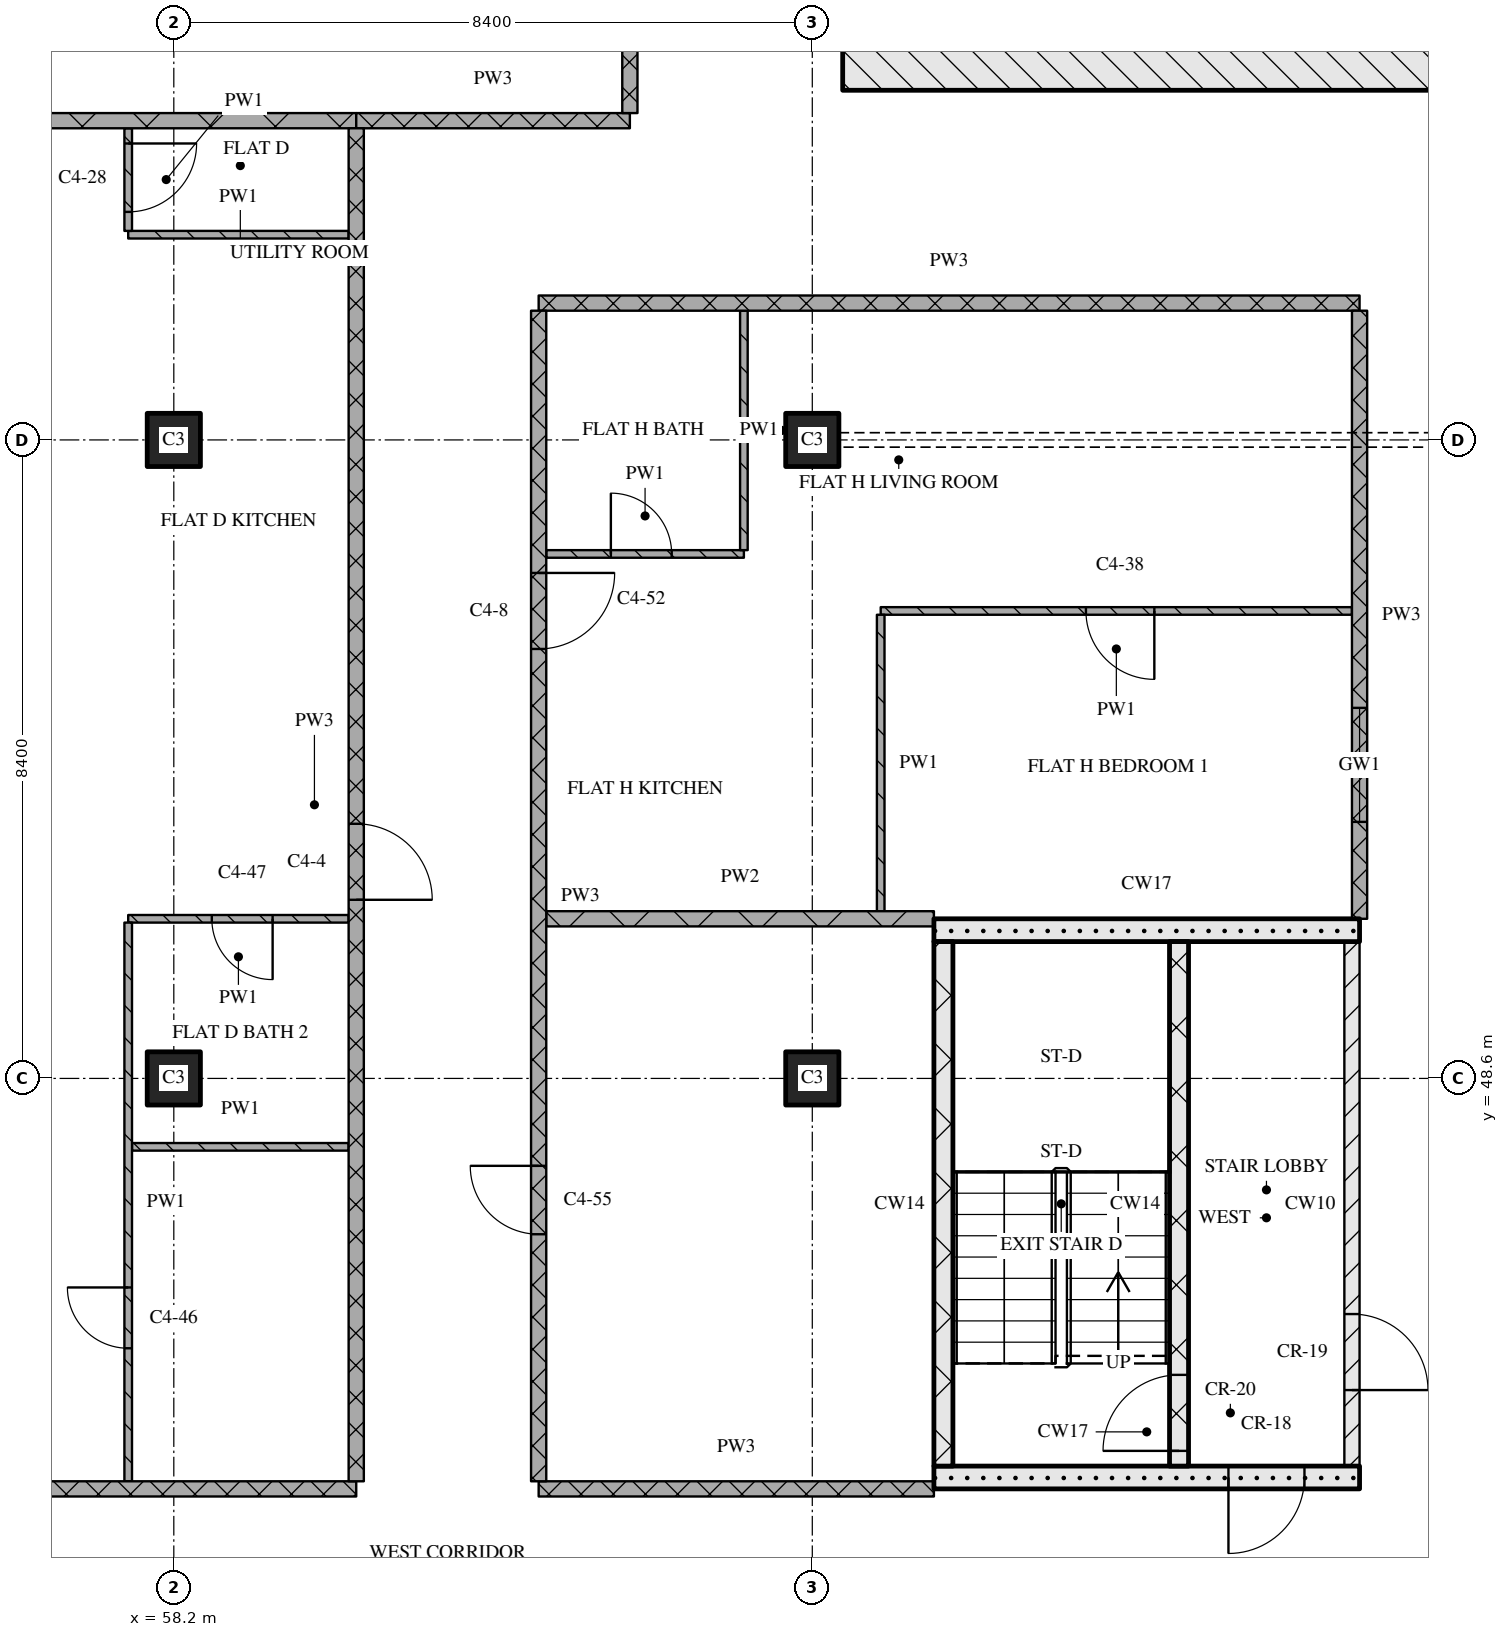
"""IFC4 building model, lengths in metres.
Left out: names, types, materials, properties, quantities, classifications, styles, units other than length and angle.
Written with IfcOpenShell. Run it as: python <this file> out.ifc"""

import sys

from ifc_helpers import new_model, si_unit, direction, frame, frame_2d, origin, origin_2d, place, context, subcontext, project, spatial, rectangle, extrude, element, fill, save


model = new_model("IFC4")
c1 = context("Model", 3, precision=1e-05, world=origin(), true_north=direction((0.0, 1.0)))
c2 = subcontext(c1, "Body", "Model", "MODEL_VIEW")
j1 = project(units=[si_unit("LENGTHUNIT", "METRE"), si_unit("PLANEANGLEUNIT", "RADIAN")], contexts=[c1])
p1 = place(None, origin())
s1 = spatial("IfcSite", under=j1, at=p1, CompositionType="ELEMENT")
p2 = place(p1, origin())
s2 = spatial("IfcBuilding", under=s1, at=p2, CompositionType="ELEMENT")
p3 = place(p2, frame((0.0, 0.0, 179.85)))
s3 = spatial("IfcBuildingStorey", under=s2, at=p3, CompositionType="ELEMENT", Elevation=179.85)
for number, where, z_axis, x_axis in (
    (1, (58.2, 48.6, 0.0), (0.0, 0.0, 1.0), (1.0, 0.0, 0.0)),
    (2, (58.2, 57.0, 0.0), (0.0, 0.0, 1.0), (1.0, 0.0, 0.0)),
    (3, (66.6, 48.6, 0.0), (0.0, 0.0, 1.0), (1.0, 0.0, 0.0)),
    (4, (66.6, 57.0, 0.0), (0.0, 0.0, 1.0), (1.0, 0.0, 0.0)),
):
    element("IfcColumn", number, at=place(p3, frame(where, z_axis=z_axis, x_axis=x_axis)), inside=s3, PredefinedType="COLUMN", context=c2, shape_type="SweptSolid", body=[
        extrude(rectangle(XDim=0.7, YDim=0.7, at=origin_2d()), origin(), (0.0, 0.0, 1.0), 3.6),
    ])
p4 = place(p3, frame((67.0, 62.0, 0.0), z_axis=(0.0, 0.0, 1.0), x_axis=(1.0, 0.0, 0.0)))
e5 = element("IfcWall", 5, at=p4, inside=s3, PredefinedType="SOLIDWALL", context=c2, shape_type="SweptSolid", body=[
    extrude(rectangle(XDim=41.2, YDim=0.8, at=frame_2d((20.6, 0.0))), origin(), (0.0, 0.0, 1.0), 3.32),
])
p5 = place(p4, frame((20.95, 0.0, 0.0)))
e6 = element("IfcOpeningElement", 6, at=p5, cuts=e5, PredefinedType="OPENING", context=c2, shape_type="SweptSolid", body=[
    extrude(rectangle(XDim=1.8, YDim=2.1, at=frame_2d((0.9, 1.05))), frame((0.0, 0.41, 0.0), z_axis=(0.0, -1.0, 0.0), x_axis=(1.0, 0.0, 0.0)), (0.0, 0.0, 1.0), 0.82),
])
p6 = place(p3, frame((68.2, 43.35, 0.0), z_axis=(0.0, 0.0, 1.0), x_axis=(1.0, 0.0, 0.0)))
e7 = element("IfcWall", 7, at=p6, inside=s3, PredefinedType="SOLIDWALL", context=c2, shape_type="SweptSolid", body=[
    extrude(rectangle(XDim=5.6, YDim=0.3, at=frame_2d((2.8, 0.0))), origin(), (0.0, 0.0, 1.0), 3.32),
])
p7 = place(p6, frame((3.875, 0.0, 0.0)))
e8 = element("IfcOpeningElement", 8, at=p7, cuts=e7, PredefinedType="OPENING", context=c2, shape_type="SweptSolid", body=[
    extrude(rectangle(XDim=1.0, YDim=2.1, at=frame_2d((0.5, 1.05))), frame((0.0, 0.16, 0.0), z_axis=(0.0, -1.0, 0.0), x_axis=(1.0, 0.0, 0.0)), (0.0, 0.0, 1.0), 0.32),
])
p8 = place(p3, frame((68.325, 43.5, 0.0), z_axis=(0.0, 0.0, 1.0), x_axis=(0.0, 1.0, 0.0)))
e9 = element("IfcWall", 9, at=p8, inside=s3, PredefinedType="SOLIDWALL", context=c2, shape_type="SweptSolid", body=[
    extrude(rectangle(XDim=6.9, YDim=0.25, at=frame_2d((3.45, 0.0))), origin(), (0.0, 0.0, 1.0), 3.32),
])
p9 = place(p3, frame((71.425, 43.5, 0.0), z_axis=(0.0, 0.0, 1.0), x_axis=(0.0, 1.0, 0.0)))
e10 = element("IfcWall", 10, at=p9, inside=s3, PredefinedType="SOLIDWALL", context=c2, shape_type="SweptSolid", body=[
    extrude(rectangle(XDim=6.9, YDim=0.25, at=frame_2d((3.45, 0.0))), origin(), (0.0, 0.0, 1.0), 3.32),
])
p10 = place(p9, frame((0.2, 0.0, 0.0)))
e11 = element("IfcOpeningElement", 11, at=p10, cuts=e10, PredefinedType="OPENING", context=c2, shape_type="SweptSolid", body=[
    extrude(rectangle(XDim=1.0, YDim=2.1, at=frame_2d((0.5, 1.05))), frame((0.0, 0.135, 0.0), z_axis=(0.0, -1.0, 0.0), x_axis=(1.0, 0.0, 0.0)), (0.0, 0.0, 1.0), 0.27),
])
p11 = place(p3, frame((73.7, 43.5, 0.0), z_axis=(0.0, 0.0, 1.0), x_axis=(0.0, 1.0, 0.0)))
e12 = element("IfcWall", 12, at=p11, inside=s3, PredefinedType="PARTITIONING", context=c2, shape_type="SweptSolid", body=[
    extrude(rectangle(XDim=6.9, YDim=0.2, at=frame_2d((3.45, 0.0))), origin(), (0.0, 0.0, 1.0), 3.32),
])
p12 = place(p11, frame((1.0, 0.0, 0.0)))
e13 = element("IfcOpeningElement", 13, at=p12, cuts=e12, PredefinedType="OPENING", context=c2, shape_type="SweptSolid", body=[
    extrude(rectangle(XDim=1.0, YDim=2.1, at=frame_2d((0.5, 1.05))), frame((0.0, 0.11, 0.0), z_axis=(0.0, -1.0, 0.0), x_axis=(1.0, 0.0, 0.0)), (0.0, 0.0, 1.0), 0.22),
])
p13 = place(p3, frame((68.2, 50.55, 0.0), z_axis=(0.0, 0.0, 1.0), x_axis=(1.0, 0.0, 0.0)))
e14 = element("IfcWall", 14, at=p13, inside=s3, PredefinedType="SOLIDWALL", context=c2, shape_type="SweptSolid", body=[
    extrude(rectangle(XDim=5.6, YDim=0.3, at=frame_2d((2.8, 0.0))), origin(), (0.0, 0.0, 1.0), 3.32),
])
p14 = place(p3, frame((48.28, 43.2, 0.0), z_axis=(0.0, 0.0, 1.0), x_axis=(1.0, 0.0, 0.0)))
e15 = element("IfcWall", 15, at=p14, inside=s3, PredefinedType="PARTITIONING", context=c2, shape_type="SweptSolid", body=[
    extrude(rectangle(XDim=12.32, YDim=0.2, at=frame_2d((6.16, 0.0))), origin(), (0.0, 0.0, 1.0), 3.32),
])
p15 = place(p3, frame((63.0, 43.2, 0.0), z_axis=(0.0, 0.0, 1.0), x_axis=(1.0, 0.0, 0.0)))
e16 = element("IfcWall", 16, at=p15, inside=s3, PredefinedType="PARTITIONING", context=c2, shape_type="SweptSolid", body=[
    extrude(rectangle(XDim=5.2, YDim=0.2, at=frame_2d((2.6, 0.0))), origin(), (0.0, 0.0, 1.0), 3.32),
])
p16 = place(p3, frame((57.65, 47.7, 0.0), z_axis=(0.0, 0.0, 1.0), x_axis=(1.0, 0.0, 0.0)))
e17 = element("IfcWall", 17, at=p16, inside=s3, PredefinedType="PARTITIONING", context=c2, shape_type="SweptSolid", body=[
    extrude(rectangle(XDim=2.85, YDim=0.1, at=frame_2d((1.425, 0.0))), origin(), (0.0, 0.0, 1.0), 3.32),
])
p17 = place(p3, frame((63.1, 50.7, 0.0), z_axis=(0.0, 0.0, 1.0), x_axis=(1.0, 0.0, 0.0)))
e18 = element("IfcWall", 18, at=p17, inside=s3, PredefinedType="PARTITIONING", context=c2, shape_type="SweptSolid", body=[
    extrude(rectangle(XDim=5.1, YDim=0.2, at=frame_2d((2.55, 0.0))), origin(), (0.0, 0.0, 1.0), 3.32),
])
p18 = place(p3, frame((60.5, 50.7, 0.0), z_axis=(0.0, 0.0, 1.0), x_axis=(-1.0, 0.0, 0.0)))
e19 = element("IfcWall", 19, at=p18, inside=s3, PredefinedType="PARTITIONING", context=c2, shape_type="SweptSolid", body=[
    extrude(rectangle(XDim=2.9, YDim=0.1, at=frame_2d((1.45, 0.0))), origin(), (0.0, 0.0, 1.0), 3.32),
])
p19 = place(p18, frame((1.0, 0.0, 0.0)))
e20 = element("IfcOpeningElement", 20, at=p19, cuts=e19, PredefinedType="OPENING", context=c2, shape_type="SweptSolid", body=[
    extrude(rectangle(XDim=0.8, YDim=2.1, at=frame_2d((0.4, 1.05))), frame((0.0, 0.06, 0.0), z_axis=(0.0, -1.0, 0.0), x_axis=(1.0, 0.0, 0.0)), (0.0, 0.0, 1.0), 0.12),
])
p20 = place(p3, frame((73.7, 54.75, 0.0), z_axis=(0.0, 0.0, 1.0), x_axis=(-1.0, 0.0, 0.0)))
e21 = element("IfcWall", 21, at=p20, inside=s3, PredefinedType="PARTITIONING", context=c2, shape_type="SweptSolid", body=[
    extrude(rectangle(XDim=6.2, YDim=0.1, at=frame_2d((3.1, 0.0))), origin(), (0.0, 0.0, 1.0), 3.32),
])
p21 = place(p20, frame((2.6, 0.0, 0.0)))
e22 = element("IfcOpeningElement", 22, at=p21, cuts=e21, PredefinedType="OPENING", context=c2, shape_type="SweptSolid", body=[
    extrude(rectangle(XDim=0.9, YDim=2.1, at=frame_2d((0.45, 1.05))), frame((0.0, 0.06, 0.0), z_axis=(0.0, -1.0, 0.0), x_axis=(1.0, 0.0, 0.0)), (0.0, 0.0, 1.0), 0.12),
])
p22 = place(p3, frame((63.1, 55.5, 0.0), z_axis=(0.0, 0.0, 1.0), x_axis=(1.0, 0.0, 0.0)))
e23 = element("IfcWall", 23, at=p22, inside=s3, PredefinedType="PARTITIONING", context=c2, shape_type="SweptSolid", body=[
    extrude(rectangle(XDim=2.6, YDim=0.1, at=frame_2d((1.3, 0.0))), origin(), (0.0, 0.0, 1.0), 3.32),
])
p23 = place(p22, frame((0.85, 0.0, 0.0)))
e24 = element("IfcOpeningElement", 24, at=p23, cuts=e23, PredefinedType="OPENING", context=c2, shape_type="SweptSolid", body=[
    extrude(rectangle(XDim=0.8, YDim=2.1, at=frame_2d((0.4, 1.05))), frame((0.0, 0.06, 0.0), z_axis=(0.0, -1.0, 0.0), x_axis=(1.0, 0.0, 0.0)), (0.0, 0.0, 1.0), 0.12),
])
p24 = place(p3, frame((63.0, 58.8, 0.0), z_axis=(0.0, 0.0, 1.0), x_axis=(1.0, 0.0, 0.0)))
e25 = element("IfcWall", 25, at=p24, inside=s3, PredefinedType="PARTITIONING", context=c2, shape_type="SweptSolid", body=[
    extrude(rectangle(XDim=10.8, YDim=0.2, at=frame_2d((5.4, 0.0))), origin(), (0.0, 0.0, 1.0), 3.32),
])
p25 = place(p3, frame((57.6, 59.7, 0.0), z_axis=(0.0, 0.0, 1.0), x_axis=(1.0, 0.0, 0.0)))
e26 = element("IfcWall", 26, at=p25, inside=s3, PredefinedType="PARTITIONING", context=c2, shape_type="SweptSolid", body=[
    extrude(rectangle(XDim=2.9, YDim=0.1, at=frame_2d((1.45, 0.0))), origin(), (0.0, 0.0, 1.0), 3.32),
])
p26 = place(p3, frame((60.6, 61.2, 0.0), z_axis=(0.0, 0.0, 1.0), x_axis=(1.0, 0.0, 0.0)))
e27 = element("IfcWall", 27, at=p26, inside=s3, PredefinedType="PARTITIONING", context=c2, shape_type="SweptSolid", body=[
    extrude(rectangle(XDim=3.6, YDim=0.2, at=frame_2d((1.8, 0.0))), origin(), (0.0, 0.0, 1.0), 3.32),
])
p27 = place(p3, frame((48.28, 61.2, 0.0), z_axis=(0.0, 0.0, 1.0), x_axis=(1.0, 0.0, 0.0)))
e28 = element("IfcWall", 28, at=p27, inside=s3, PredefinedType="PARTITIONING", context=c2, shape_type="SweptSolid", body=[
    extrude(rectangle(XDim=12.32, YDim=0.2, at=frame_2d((6.16, 0.0))), origin(), (0.0, 0.0, 1.0), 3.32),
])
p28 = place(p3, frame((57.6, 50.65, 0.0), z_axis=(0.0, 0.0, 1.0), x_axis=(0.0, -1.0, 0.0)))
e29 = element("IfcWall", 29, at=p28, inside=s3, PredefinedType="PARTITIONING", context=c2, shape_type="SweptSolid", body=[
    extrude(rectangle(XDim=7.35, YDim=0.1, at=frame_2d((3.675, 0.0))), origin(), (0.0, 0.0, 1.0), 3.32),
])
p29 = place(p28, frame((4.8, 0.0, 0.0)))
e30 = element("IfcOpeningElement", 30, at=p29, cuts=e29, PredefinedType="OPENING", context=c2, shape_type="SweptSolid", body=[
    extrude(rectangle(XDim=0.8, YDim=2.1, at=frame_2d((0.4, 1.05))), frame((0.0, 0.06, 0.0), z_axis=(0.0, -1.0, 0.0), x_axis=(1.0, 0.0, 0.0)), (0.0, 0.0, 1.0), 0.12),
])
p30 = place(p3, frame((57.6, 61.1, 0.0), z_axis=(0.0, 0.0, 1.0), x_axis=(0.0, -1.0, 0.0)))
e31 = element("IfcWall", 31, at=p30, inside=s3, PredefinedType="PARTITIONING", context=c2, shape_type="SweptSolid", body=[
    extrude(rectangle(XDim=1.35, YDim=0.1, at=frame_2d((0.675, 0.0))), origin(), (0.0, 0.0, 1.0), 3.32),
])
p31 = place(p30, frame((0.2, 0.0, 0.0)))
e32 = element("IfcOpeningElement", 32, at=p31, cuts=e31, PredefinedType="OPENING", context=c2, shape_type="SweptSolid", body=[
    extrude(rectangle(XDim=0.9, YDim=2.1, at=frame_2d((0.45, 1.05))), frame((0.0, 0.06, 0.0), z_axis=(0.0, -1.0, 0.0), x_axis=(1.0, 0.0, 0.0)), (0.0, 0.0, 1.0), 0.12),
])
p32 = place(p3, frame((60.6, 43.3, 0.0), z_axis=(0.0, 0.0, 1.0), x_axis=(0.0, 1.0, 0.0)))
e33 = element("IfcWall", 33, at=p32, inside=s3, PredefinedType="PARTITIONING", context=c2, shape_type="SweptSolid", body=[
    extrude(rectangle(XDim=17.8, YDim=0.2, at=frame_2d((8.9, 0.0))), origin(), (0.0, 0.0, 1.0), 3.32),
])
p33 = place(p32, frame((7.65, 0.0, 0.0)))
e34 = element("IfcOpeningElement", 34, at=p33, cuts=e33, PredefinedType="OPENING", context=c2, shape_type="SweptSolid", body=[
    extrude(rectangle(XDim=1.0, YDim=2.1, at=frame_2d((0.5, 1.05))), frame((0.0, 0.11, 0.0), z_axis=(0.0, -1.0, 0.0), x_axis=(1.0, 0.0, 0.0)), (0.0, 0.0, 1.0), 0.22),
])
p34 = place(p3, frame((63.0, 58.7, 0.0), z_axis=(0.0, 0.0, 1.0), x_axis=(0.0, -1.0, 0.0)))
e35 = element("IfcWall", 35, at=p34, inside=s3, PredefinedType="PARTITIONING", context=c2, shape_type="SweptSolid", body=[
    extrude(rectangle(XDim=15.4, YDim=0.2, at=frame_2d((7.7, 0.0))), origin(), (0.0, 0.0, 1.0), 3.32),
])
p35 = place(p34, frame((3.45, 0.0, 0.0)))
e36 = element("IfcOpeningElement", 36, at=p35, cuts=e35, PredefinedType="OPENING", context=c2, shape_type="SweptSolid", body=[
    extrude(rectangle(XDim=1.0, YDim=2.1, at=frame_2d((0.5, 1.05))), frame((0.0, 0.11, 0.0), z_axis=(0.0, -1.0, 0.0), x_axis=(1.0, 0.0, 0.0)), (0.0, 0.0, 1.0), 0.22),
])
p36 = place(p34, frame((11.25, 0.0, 0.0)))
e37 = element("IfcOpeningElement", 37, at=p36, cuts=e35, PredefinedType="OPENING", context=c2, shape_type="SweptSolid", body=[
    extrude(rectangle(XDim=0.9, YDim=2.1, at=frame_2d((0.45, 1.05))), frame((0.0, 0.11, 0.0), z_axis=(0.0, -1.0, 0.0), x_axis=(1.0, 0.0, 0.0)), (0.0, 0.0, 1.0), 0.22),
])
p37 = place(p3, frame((64.2, 61.3, 0.0), z_axis=(0.0, 0.0, 1.0), x_axis=(0.0, 1.0, 0.0)))
e38 = element("IfcWall", 38, at=p37, inside=s3, PredefinedType="PARTITIONING", context=c2, shape_type="SweptSolid", body=[
    extrude(rectangle(XDim=14.02, YDim=0.2, at=frame_2d((7.01, 0.0))), origin(), (0.0, 0.0, 1.0), 3.32),
])
p38 = place(p37, frame((3.45, 0.0, 0.0)))
e39 = element("IfcOpeningElement", 39, at=p38, cuts=e38, PredefinedType="OPENING", context=c2, shape_type="SweptSolid", body=[
    extrude(rectangle(XDim=1.0, YDim=2.1, at=frame_2d((0.5, 1.05))), frame((0.0, 0.11, 0.0), z_axis=(0.0, -1.0, 0.0), x_axis=(1.0, 0.0, 0.0)), (0.0, 0.0, 1.0), 0.22),
])
p39 = place(p3, frame((65.7, 58.7, 0.0), z_axis=(0.0, 0.0, 1.0), x_axis=(0.0, -1.0, 0.0)))
e40 = element("IfcWall", 40, at=p39, inside=s3, PredefinedType="PARTITIONING", context=c2, shape_type="SweptSolid", body=[
    extrude(rectangle(XDim=3.15, YDim=0.1, at=frame_2d((1.575, 0.0))), origin(), (0.0, 0.0, 1.0), 3.32),
])
p40 = place(p3, frame((67.5, 54.7, 0.0), z_axis=(0.0, 0.0, 1.0), x_axis=(0.0, -1.0, 0.0)))
e41 = element("IfcWall", 41, at=p40, inside=s3, PredefinedType="PARTITIONING", context=c2, shape_type="SweptSolid", body=[
    extrude(rectangle(XDim=3.9, YDim=0.1, at=frame_2d((1.95, 0.0))), origin(), (0.0, 0.0, 1.0), 3.32),
])
p41 = place(p3, frame((73.8, 58.7, 0.0), z_axis=(0.0, 0.0, 1.0), x_axis=(0.0, -1.0, 0.0)))
e42 = element("IfcWall", 42, at=p41, inside=s3, PredefinedType="PARTITIONING", context=c2, shape_type="SweptSolid", body=[
    extrude(rectangle(XDim=8.0, YDim=0.2, at=frame_2d((4.0, 0.0))), origin(), (0.0, 0.0, 1.0), 3.32),
])
p42 = place(p41, frame((5.225, 0.0, 0.9)))
e43 = element("IfcOpeningElement", 43, at=p42, cuts=e42, PredefinedType="OPENING", context=c2, shape_type="SweptSolid", body=[
    extrude(rectangle(XDim=1.5, YDim=1.5, at=frame_2d((0.75, 0.75))), frame((0.0, 0.11, 0.0), z_axis=(0.0, -1.0, 0.0), x_axis=(1.0, 0.0, 0.0)), (0.0, 0.0, 1.0), 0.22),
])
p43 = place(p7, origin())
e44 = element("IfcDoor", 44, at=p43, inside=s3, OperationType="SINGLE_SWING_RIGHT", PredefinedType="DOOR", context=c2, shape_type="SweptSolid", body=[
    extrude(rectangle(XDim=1.0, YDim=2.1, at=frame_2d((0.5, 1.05))), frame((0.0, 0.025, 0.0), z_axis=(0.0, -1.0, 0.0), x_axis=(1.0, 0.0, 0.0)), (0.0, 0.0, 1.0), 0.05),
])
fill(e8, e44)
p44 = place(p10, origin())
e45 = element("IfcDoor", 45, at=p44, inside=s3, OperationType="SINGLE_SWING_LEFT", PredefinedType="DOOR", context=c2, shape_type="SweptSolid", body=[
    extrude(rectangle(XDim=1.0, YDim=2.1, at=frame_2d((0.5, 1.05))), frame((0.0, 0.025, 0.0), z_axis=(0.0, -1.0, 0.0), x_axis=(1.0, 0.0, 0.0)), (0.0, 0.0, 1.0), 0.05),
])
fill(e11, e45)
p45 = place(p12, origin())
e46 = element("IfcDoor", 46, at=p45, inside=s3, OperationType="SINGLE_SWING_RIGHT", PredefinedType="DOOR", context=c2, shape_type="SweptSolid", body=[
    extrude(rectangle(XDim=1.0, YDim=2.1, at=frame_2d((0.5, 1.05))), frame((0.0, 0.025, 0.0), z_axis=(0.0, -1.0, 0.0), x_axis=(1.0, 0.0, 0.0)), (0.0, 0.0, 1.0), 0.05),
])
fill(e13, e46)
p46 = place(p19, origin())
e47 = element("IfcDoor", 47, at=p46, inside=s3, OperationType="SINGLE_SWING_LEFT", PredefinedType="DOOR", context=c2, shape_type="SweptSolid", body=[
    extrude(rectangle(XDim=0.8, YDim=2.1, at=frame_2d((0.4, 1.05))), frame((0.0, 0.025, 0.0), z_axis=(0.0, -1.0, 0.0), x_axis=(1.0, 0.0, 0.0)), (0.0, 0.0, 1.0), 0.05),
])
fill(e20, e47)
p47 = place(p21, origin())
e48 = element("IfcDoor", 48, at=p47, inside=s3, OperationType="SINGLE_SWING_LEFT", PredefinedType="DOOR", context=c2, shape_type="SweptSolid", body=[
    extrude(rectangle(XDim=0.9, YDim=2.1, at=frame_2d((0.45, 1.05))), frame((0.0, 0.025, 0.0), z_axis=(0.0, -1.0, 0.0), x_axis=(1.0, 0.0, 0.0)), (0.0, 0.0, 1.0), 0.05),
])
fill(e22, e48)
p48 = place(p23, origin())
e49 = element("IfcDoor", 49, at=p48, inside=s3, OperationType="SINGLE_SWING_LEFT", PredefinedType="DOOR", context=c2, shape_type="SweptSolid", body=[
    extrude(rectangle(XDim=0.8, YDim=2.1, at=frame_2d((0.4, 1.05))), frame((0.0, 0.025, 0.0), z_axis=(0.0, -1.0, 0.0), x_axis=(1.0, 0.0, 0.0)), (0.0, 0.0, 1.0), 0.05),
])
fill(e24, e49)
p49 = place(p29, origin())
e50 = element("IfcDoor", 50, at=p49, inside=s3, OperationType="SINGLE_SWING_RIGHT", PredefinedType="DOOR", context=c2, shape_type="SweptSolid", body=[
    extrude(rectangle(XDim=0.8, YDim=2.1, at=frame_2d((0.4, 1.05))), frame((0.0, 0.025, 0.0), z_axis=(0.0, -1.0, 0.0), x_axis=(1.0, 0.0, 0.0)), (0.0, 0.0, 1.0), 0.05),
])
fill(e30, e50)
p50 = place(p31, origin())
e51 = element("IfcDoor", 51, at=p50, inside=s3, OperationType="SINGLE_SWING_LEFT", PredefinedType="DOOR", context=c2, shape_type="SweptSolid", body=[
    extrude(rectangle(XDim=0.9, YDim=2.1, at=frame_2d((0.45, 1.05))), frame((0.0, 0.025, 0.0), z_axis=(0.0, -1.0, 0.0), x_axis=(1.0, 0.0, 0.0)), (0.0, 0.0, 1.0), 0.05),
])
fill(e32, e51)
p51 = place(p33, origin())
e52 = element("IfcDoor", 52, at=p51, inside=s3, OperationType="SINGLE_SWING_RIGHT", PredefinedType="DOOR", context=c2, shape_type="SweptSolid", body=[
    extrude(rectangle(XDim=1.0, YDim=2.1, at=frame_2d((0.5, 1.05))), frame((0.0, 0.025, 0.0), z_axis=(0.0, -1.0, 0.0), x_axis=(1.0, 0.0, 0.0)), (0.0, 0.0, 1.0), 0.05),
])
fill(e34, e52)
p52 = place(p35, origin())
e53 = element("IfcDoor", 53, at=p52, inside=s3, OperationType="SINGLE_SWING_LEFT", PredefinedType="DOOR", context=c2, shape_type="SweptSolid", body=[
    extrude(rectangle(XDim=1.0, YDim=2.1, at=frame_2d((0.5, 1.05))), frame((0.0, 0.025, 0.0), z_axis=(0.0, -1.0, 0.0), x_axis=(1.0, 0.0, 0.0)), (0.0, 0.0, 1.0), 0.05),
])
fill(e36, e53)
p53 = place(p36, origin())
e54 = element("IfcDoor", 54, at=p53, inside=s3, OperationType="SINGLE_SWING_RIGHT", PredefinedType="DOOR", context=c2, shape_type="SweptSolid", body=[
    extrude(rectangle(XDim=0.9, YDim=2.1, at=frame_2d((0.45, 1.05))), frame((0.0, 0.025, 0.0), z_axis=(0.0, -1.0, 0.0), x_axis=(1.0, 0.0, 0.0)), (0.0, 0.0, 1.0), 0.05),
])
fill(e37, e54)
p54 = place(p42, origin())
e55 = element("IfcWindow", 55, at=p54, inside=s3, PartitioningType="SINGLE_PANEL", PredefinedType="WINDOW", context=c2, shape_type="SweptSolid", body=[
    extrude(rectangle(XDim=1.5, YDim=1.5, at=frame_2d((0.75, 0.75))), frame((0.0, 0.03, 0.0), z_axis=(0.0, -1.0, 0.0), x_axis=(1.0, 0.0, 0.0)), (0.0, 0.0, 1.0), 0.06),
])
fill(e43, e55)
save(model, sys.argv[1])
